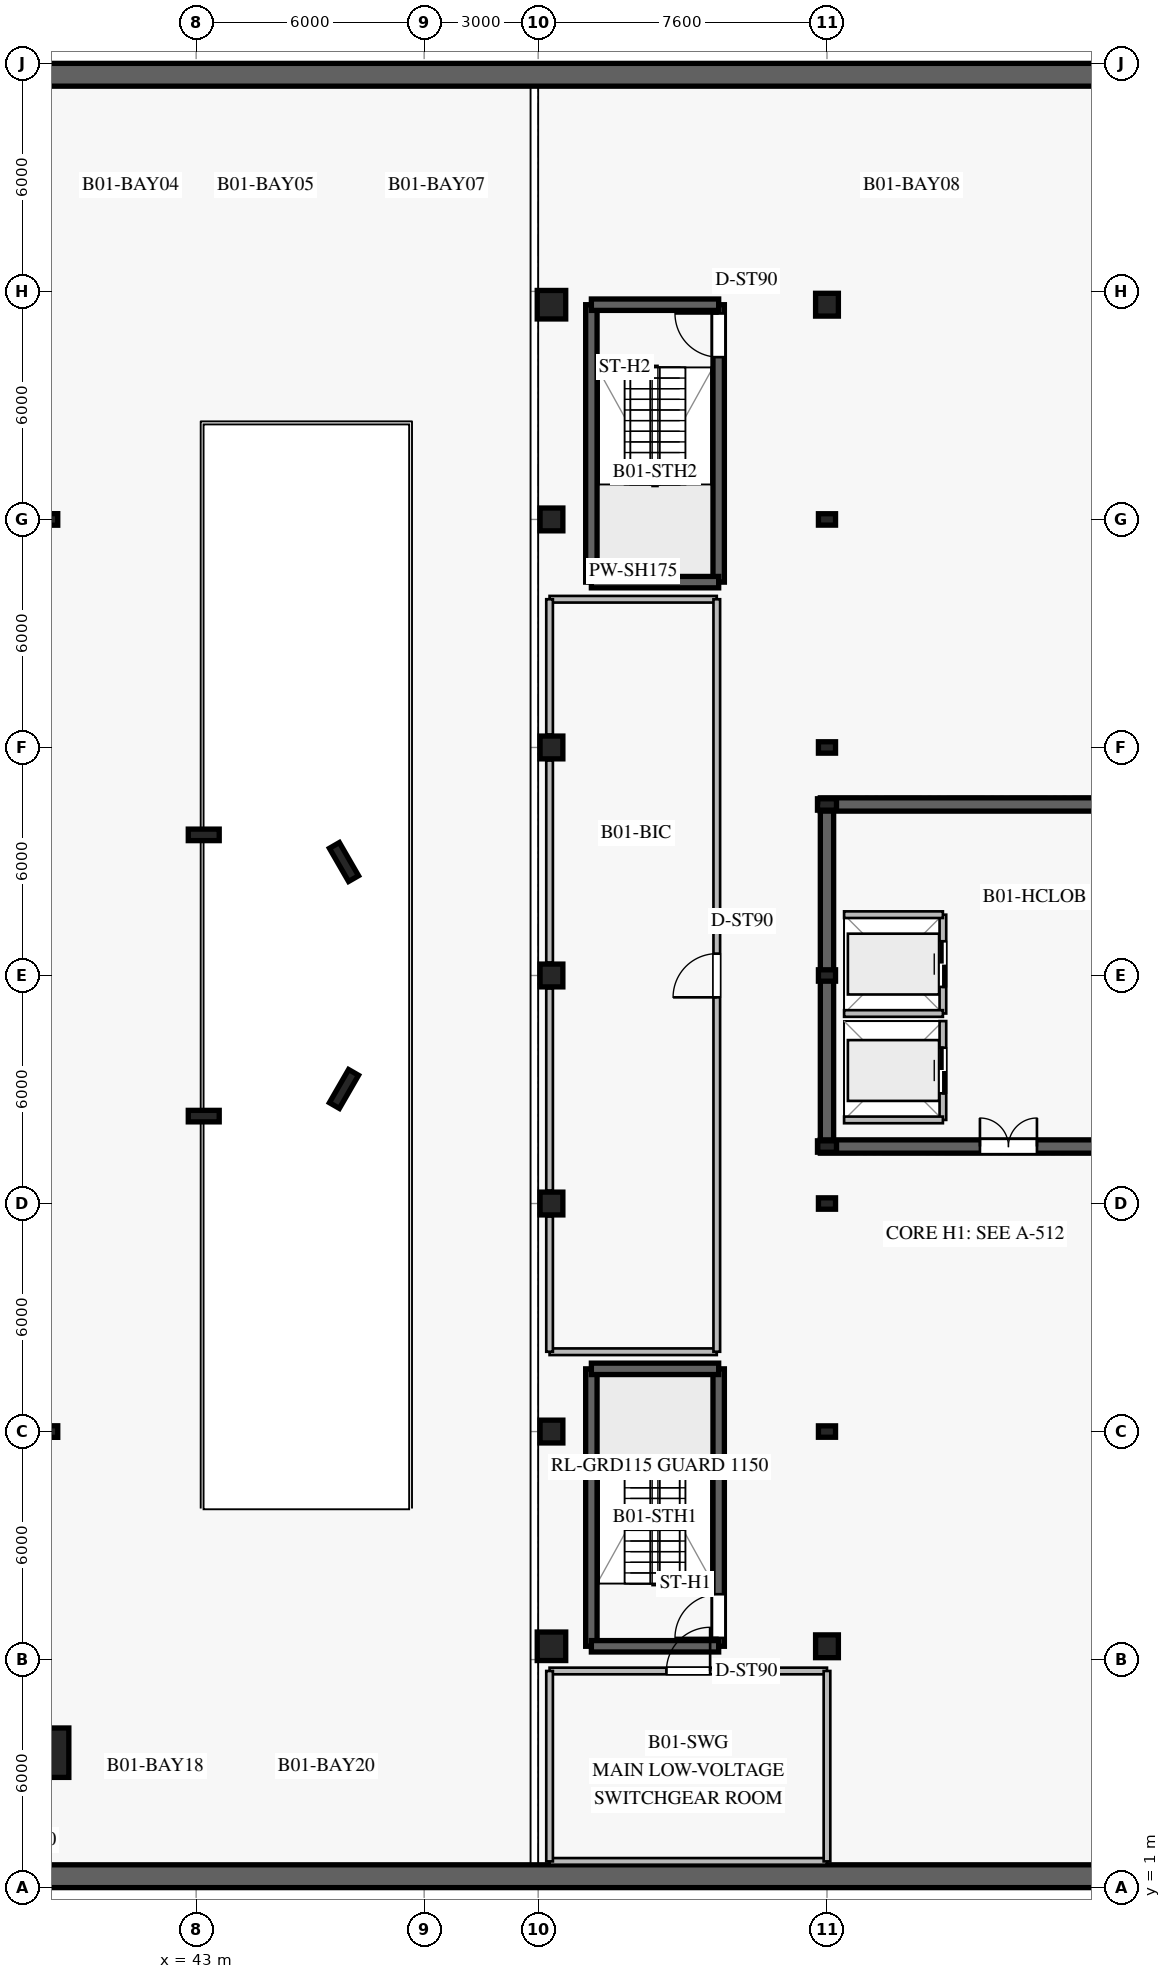
"""IFC4 building model, lengths in metres.
Left out: names, types, materials, properties, quantities, classifications, styles, units other than length and angle.
Written with IfcOpenShell. Run it as: python <this file> out.ifc"""

import sys

from ifc_helpers import new_model, si_unit, direction, frame, frame_2d, origin, origin_2d, place, context, subcontext, project, spatial, rectangle, i_section, extrude, element, fill, save


model = new_model("IFC4")
c1 = context("Model", 3, precision=1e-05, world=origin(), true_north=direction((0.0, 1.0)))
c2 = subcontext(c1, "Body", "Model", "MODEL_VIEW")
j1 = project(units=[si_unit("LENGTHUNIT", "METRE"), si_unit("PLANEANGLEUNIT", "RADIAN")], contexts=[c1])
p1 = place(None, origin())
s1 = spatial("IfcSite", under=j1, at=p1, CompositionType="ELEMENT")
p2 = place(p1, origin())
s2 = spatial("IfcBuilding", under=s1, at=p2, CompositionType="ELEMENT")
p3 = place(p2, frame((0.0, 0.0, -4.2)))
s3 = spatial("IfcBuildingStorey", under=s2, at=p3, CompositionType="ELEMENT", Elevation=-4.2)
for number, where, z_axis, x_axis in (
    (1, (1.0, 1.3, 0.0), (0.0, 0.0, 1.0), (1.0, 0.0, 0.0)),
    (2, (75.0, 48.7, 0.0), (0.0, 0.0, 1.0), (-1.0, 0.0, 0.0)),
):
    element("IfcWall", number, at=place(p3, frame(where, z_axis=z_axis, x_axis=x_axis)), inside=s3, PredefinedType="USERDEFINED", context=c2, shape_type="SweptSolid", body=[
        extrude(rectangle(XDim=74.0, YDim=0.6, at=frame_2d((37.0, 0.0))), origin(), (0.0, 0.0, 1.0), 3.88),
    ])
p4 = place(p3, frame((59.425, 20.5, 0.0), z_axis=(0.0, 0.0, 1.0), x_axis=(1.0, 0.0, 0.0)))
e3 = element("IfcWall", 3, at=p4, inside=s3, PredefinedType="SHEAR", context=c2, shape_type="SweptSolid", body=[
    extrude(rectangle(XDim=8.15, YDim=0.35, at=frame_2d((4.075, 0.0))), origin(), (0.0, 0.0, 1.0), 3.88),
])
p5 = place(p4, frame((4.2, 0.0, 0.0)))
e4 = element("IfcOpeningElement", 4, at=p5, cuts=e3, PredefinedType="OPENING", context=c2, shape_type="SweptSolid", body=[
    extrude(rectangle(XDim=1.5, YDim=2.2, at=frame_2d((0.75, 1.1))), frame((0.0, 0.185, 0.0), z_axis=(0.0, -1.0, 0.0), x_axis=(1.0, 0.0, 0.0)), (0.0, 0.0, 1.0), 0.37),
])
p6 = place(p3, frame((67.575, 29.5, 0.0), z_axis=(0.0, 0.0, 1.0), x_axis=(-1.0, 0.0, 0.0)))
e5 = element("IfcWall", 5, at=p6, inside=s3, PredefinedType="SHEAR", context=c2, shape_type="SweptSolid", body=[
    extrude(rectangle(XDim=8.15, YDim=0.35, at=frame_2d((4.075, 0.0))), origin(), (0.0, 0.0, 1.0), 3.88),
])
p7 = place(p3, frame((59.6, 29.325, 0.0), z_axis=(0.0, 0.0, 1.0), x_axis=(0.0, -1.0, 0.0)))
e6 = element("IfcWall", 6, at=p7, inside=s3, PredefinedType="SHEAR", context=c2, shape_type="SweptSolid", body=[
    extrude(rectangle(XDim=8.65, YDim=0.35, at=frame_2d((4.325, 0.0))), origin(), (0.0, 0.0, 1.0), 3.88),
])
for number, where, z_axis, x_axis in (
    (7, (59.6, 20.5, 0.0), (0.0, 0.0, 1.0), (1.0, 0.0, 0.0)),
    (8, (59.6, 29.5, 0.0), (0.0, 0.0, 1.0), (1.0, 0.0, 0.0)),
):
    element("IfcColumn", number, at=place(p3, frame(where, z_axis=z_axis, x_axis=x_axis)), inside=s3, PredefinedType="COLUMN", context=c2, shape_type="SweptSolid", body=[
        extrude(i_section(OverallWidth=0.3, OverallDepth=0.5, WebThickness=0.014, FlangeThickness=0.028, at=origin_2d()), origin(), (0.0, 0.0, 1.0), 4.2),
    ])
p8 = place(p3, frame((56.75, 7.35, 0.0), z_axis=(0.0, 0.0, 1.0), x_axis=(0.0, 1.0, 0.0)))
e9 = element("IfcWall", 9, at=p8, inside=s3, PredefinedType="SOLIDWALL", context=c2, shape_type="SweptSolid", body=[
    extrude(rectangle(XDim=7.3, YDim=0.3, at=frame_2d((3.65, 0.0))), origin(), (0.0, 0.0, 1.0), 3.88),
])
p9 = place(p8, frame((0.22, 0.0, 0.0)))
e10 = element("IfcOpeningElement", 10, at=p9, cuts=e9, PredefinedType="OPENING", context=c2, shape_type="SweptSolid", body=[
    extrude(rectangle(XDim=1.15, YDim=2.2, at=frame_2d((0.575, 1.1))), frame((0.0, 0.16, 0.0), z_axis=(0.0, -1.0, 0.0), x_axis=(1.0, 0.0, 0.0)), (0.0, 0.0, 1.0), 0.32),
])
p10 = place(p3, frame((53.4, 7.35, 0.0), z_axis=(0.0, 0.0, 1.0), x_axis=(0.0, 1.0, 0.0)))
e11 = element("IfcWall", 11, at=p10, inside=s3, PredefinedType="SOLIDWALL", context=c2, shape_type="SweptSolid", body=[
    extrude(rectangle(XDim=7.3, YDim=0.3, at=frame_2d((3.65, 0.0))), origin(), (0.0, 0.0, 1.0), 3.88),
])
for number, where, z_axis, x_axis in (
    (12, (53.4, 14.65, 0.0), (0.0, 0.0, 1.0), (1.0, 0.0, 0.0)),
    (13, (53.4, 7.35, 0.0), (0.0, 0.0, 1.0), (1.0, 0.0, 0.0)),
):
    element("IfcWall", number, at=place(p3, frame(where, z_axis=z_axis, x_axis=x_axis)), inside=s3, PredefinedType="SOLIDWALL", context=c2, shape_type="SweptSolid", body=[
        extrude(rectangle(XDim=3.35, YDim=0.3, at=frame_2d((1.675, 0.0))), origin(), (0.0, 0.0, 1.0), 3.88),
    ])
p11 = place(p3, frame((56.75, 35.35, 0.0), z_axis=(0.0, 0.0, 1.0), x_axis=(0.0, 1.0, 0.0)))
e14 = element("IfcWall", 14, at=p11, inside=s3, PredefinedType="SOLIDWALL", context=c2, shape_type="SweptSolid", body=[
    extrude(rectangle(XDim=7.3, YDim=0.3, at=frame_2d((3.65, 0.0))), origin(), (0.0, 0.0, 1.0), 3.88),
])
p12 = place(p11, frame((5.92, 0.0, 0.0)))
e15 = element("IfcOpeningElement", 15, at=p12, cuts=e14, PredefinedType="OPENING", context=c2, shape_type="SweptSolid", body=[
    extrude(rectangle(XDim=1.15, YDim=2.2, at=frame_2d((0.575, 1.1))), frame((0.0, 0.16, 0.0), z_axis=(0.0, -1.0, 0.0), x_axis=(1.0, 0.0, 0.0)), (0.0, 0.0, 1.0), 0.32),
])
p13 = place(p3, frame((53.4, 35.35, 0.0), z_axis=(0.0, 0.0, 1.0), x_axis=(0.0, 1.0, 0.0)))
e16 = element("IfcWall", 16, at=p13, inside=s3, PredefinedType="SOLIDWALL", context=c2, shape_type="SweptSolid", body=[
    extrude(rectangle(XDim=7.3, YDim=0.3, at=frame_2d((3.65, 0.0))), origin(), (0.0, 0.0, 1.0), 3.88),
])
for number, where, z_axis, x_axis in (
    (17, (53.4, 35.35, 0.0), (0.0, 0.0, 1.0), (1.0, 0.0, 0.0)),
    (18, (53.4, 42.65, 0.0), (0.0, 0.0, 1.0), (1.0, 0.0, 0.0)),
):
    element("IfcWall", number, at=place(p3, frame(where, z_axis=z_axis, x_axis=x_axis)), inside=s3, PredefinedType="SOLIDWALL", context=c2, shape_type="SweptSolid", body=[
        extrude(rectangle(XDim=3.35, YDim=0.3, at=frame_2d((1.675, 0.0))), origin(), (0.0, 0.0, 1.0), 3.88),
    ])
for number, where, z_axis, x_axis in (
    (19, (43.2, 21.3, 0.0), (0.0, 0.0, 1.0), (1.0, 0.0, 0.0)),
    (20, (43.2, 28.7, 0.0), (0.0, 0.0, 1.0), (1.0, 0.0, 0.0)),
):
    element("IfcColumn", number, at=place(p3, frame(where, z_axis=z_axis, x_axis=x_axis)), inside=s3, PredefinedType="COLUMN", context=c2, shape_type="SweptSolid", body=[
        extrude(i_section(OverallWidth=0.303, OverallDepth=0.814, WebThickness=0.021, FlangeThickness=0.04, at=origin_2d()), origin(), (0.0, 0.0, 1.0), 4.2),
    ])
for number, where, z_axis, x_axis in (
    (21, (46.89, 27.986, 0.0), (0.0, 0.0, 1.0), (-0.5, 0.866, 0.0)),
    (22, (46.89, 22.014, 0.0), (0.0, 0.0, 1.0), (0.5, 0.866, 0.0)),
):
    element("IfcColumn", number, at=place(p3, frame(where, z_axis=z_axis, x_axis=x_axis)), inside=s3, PredefinedType="COLUMN", context=c2, shape_type="SweptSolid", body=[
        extrude(i_section(OverallWidth=0.302, OverallDepth=1.008, WebThickness=0.021, FlangeThickness=0.04, at=origin_2d()), origin(), (0.0, 0.0, 1.0), 4.2),
    ])
p14 = place(p3, frame((39.0, 4.55, 0.0), z_axis=(0.0, 0.0, 1.0), x_axis=(1.0, 0.0, 0.0)))
e23 = element("IfcColumn", 23, at=p14, inside=s3, PredefinedType="COLUMN", context=c2, shape_type="SweptSolid", body=[
    extrude(rectangle(XDim=1.3, YDim=1.3, at=origin_2d()), origin(), (0.0, 0.0, 1.0), 4.2),
])
p15 = place(p3, frame((52.35, 7.35, 0.0), z_axis=(0.0, 0.0, 1.0), x_axis=(1.0, 0.0, 0.0)))
e24 = element("IfcColumn", 24, at=p15, inside=s3, PredefinedType="COLUMN", context=c2, shape_type="SweptSolid", body=[
    extrude(rectangle(XDim=0.75, YDim=0.75, at=origin_2d()), origin(), (0.0, 0.0, 1.0), 4.2),
])
for number, where, z_axis, x_axis in (
    (25, (52.35, 13.0, 0.0), (0.0, 0.0, 1.0), (1.0, 0.0, 0.0)),
    (26, (52.35, 19.0, 0.0), (0.0, 0.0, 1.0), (1.0, 0.0, 0.0)),
    (27, (52.35, 25.0, 0.0), (0.0, 0.0, 1.0), (1.0, 0.0, 0.0)),
    (28, (52.35, 31.0, 0.0), (0.0, 0.0, 1.0), (1.0, 0.0, 0.0)),
    (29, (52.35, 37.0, 0.0), (0.0, 0.0, 1.0), (1.0, 0.0, 0.0)),
):
    element("IfcColumn", number, at=place(p3, frame(where, z_axis=z_axis, x_axis=x_axis)), inside=s3, PredefinedType="COLUMN", context=c2, shape_type="SweptSolid", body=[
        extrude(rectangle(XDim=0.6, YDim=0.6, at=origin_2d()), origin(), (0.0, 0.0, 1.0), 4.2),
    ])
p16 = place(p3, frame((52.35, 42.65, 0.0), z_axis=(0.0, 0.0, 1.0), x_axis=(1.0, 0.0, 0.0)))
e30 = element("IfcColumn", 30, at=p16, inside=s3, PredefinedType="COLUMN", context=c2, shape_type="SweptSolid", body=[
    extrude(rectangle(XDim=0.75, YDim=0.75, at=origin_2d()), origin(), (0.0, 0.0, 1.0), 4.2),
])
p17 = place(p3, frame((59.6, 7.35, 0.0), z_axis=(0.0, 0.0, 1.0), x_axis=(1.0, 0.0, 0.0)))
e31 = element("IfcColumn", 31, at=p17, inside=s3, PredefinedType="COLUMN", context=c2, shape_type="SweptSolid", body=[
    extrude(rectangle(XDim=0.6, YDim=0.6, at=origin_2d()), origin(), (0.0, 0.0, 1.0), 4.2),
])
for number, where, z_axis, x_axis in (
    (32, (59.6, 13.0, 0.0), (0.0, 0.0, 1.0), (1.0, 0.0, 0.0)),
    (33, (59.6, 19.0, 0.0), (0.0, 0.0, 1.0), (1.0, 0.0, 0.0)),
    (34, (59.6, 25.0, 0.0), (0.0, 0.0, 1.0), (1.0, 0.0, 0.0)),
    (35, (59.6, 31.0, 0.0), (0.0, 0.0, 1.0), (1.0, 0.0, 0.0)),
    (36, (59.6, 37.0, 0.0), (0.0, 0.0, 1.0), (1.0, 0.0, 0.0)),
):
    element("IfcColumn", number, at=place(p3, frame(where, z_axis=z_axis, x_axis=x_axis)), inside=s3, PredefinedType="COLUMN", context=c2, shape_type="SweptSolid", body=[
        extrude(i_section(OverallWidth=0.3, OverallDepth=0.45, WebThickness=0.014, FlangeThickness=0.026, at=origin_2d()), origin(), (0.0, 0.0, 1.0), 4.2),
    ])
p18 = place(p3, frame((59.6, 42.65, 0.0), z_axis=(0.0, 0.0, 1.0), x_axis=(1.0, 0.0, 0.0)))
e37 = element("IfcColumn", 37, at=p18, inside=s3, PredefinedType="COLUMN", context=c2, shape_type="SweptSolid", body=[
    extrude(rectangle(XDim=0.6, YDim=0.6, at=origin_2d()), origin(), (0.0, 0.0, 1.0), 4.2),
])
p19 = place(p3, frame((62.65, 21.2, 0.0), z_axis=(0.0, 0.0, 1.0), x_axis=(0.0, 1.0, 0.0)))
e38 = element("IfcWall", 38, at=p19, inside=s3, PredefinedType="PARTITIONING", context=c2, shape_type="SweptSolid", body=[
    extrude(rectangle(XDim=2.6, YDim=0.175, at=frame_2d((1.3, 0.0))), origin(), (0.0, 0.0, 1.0), 3.88),
])
p20 = place(p19, frame((0.7, 0.0, 0.0)))
e39 = element("IfcOpeningElement", 39, at=p20, cuts=e38, PredefinedType="OPENING", context=c2, shape_type="SweptSolid", body=[
    extrude(rectangle(XDim=1.2, YDim=2.2, at=frame_2d((0.6, 1.1))), frame((0.0, 0.098, 0.0), z_axis=(0.0, -1.0, 0.0), x_axis=(1.0, 0.0, 0.0)), (0.0, 0.0, 1.0), 0.195),
])
p21 = place(p3, frame((60.05, 21.2, 0.0), z_axis=(0.0, 0.0, 1.0), x_axis=(1.0, 0.0, 0.0)))
e40 = element("IfcWall", 40, at=p21, inside=s3, PredefinedType="PARTITIONING", context=c2, shape_type="SweptSolid", body=[
    extrude(rectangle(XDim=2.6, YDim=0.175, at=frame_2d((1.3, 0.0))), origin(), (0.0, 0.0, 1.0), 3.88),
])
p22 = place(p3, frame((62.65, 24.0, 0.0), z_axis=(0.0, 0.0, 1.0), x_axis=(0.0, 1.0, 0.0)))
e41 = element("IfcWall", 41, at=p22, inside=s3, PredefinedType="PARTITIONING", context=c2, shape_type="SweptSolid", body=[
    extrude(rectangle(XDim=2.6, YDim=0.175, at=frame_2d((1.3, 0.0))), origin(), (0.0, 0.0, 1.0), 3.52),
])
p23 = place(p22, frame((0.7, 0.0, 0.0)))
e42 = element("IfcOpeningElement", 42, at=p23, cuts=e41, PredefinedType="OPENING", context=c2, shape_type="SweptSolid", body=[
    extrude(rectangle(XDim=1.2, YDim=2.2, at=frame_2d((0.6, 1.1))), frame((0.0, 0.098, 0.0), z_axis=(0.0, -1.0, 0.0), x_axis=(1.0, 0.0, 0.0)), (0.0, 0.0, 1.0), 0.195),
])
for number, where, z_axis, x_axis in (
    (43, (60.05, 24.0, 0.0), (0.0, 0.0, 1.0), (1.0, 0.0, 0.0)),
    (44, (60.05, 26.6, 0.0), (0.0, 0.0, 1.0), (1.0, 0.0, 0.0)),
):
    element("IfcWall", number, at=place(p3, frame(where, z_axis=z_axis, x_axis=x_axis)), inside=s3, PredefinedType="PARTITIONING", context=c2, shape_type="SweptSolid", body=[
        extrude(rectangle(XDim=2.6, YDim=0.175, at=frame_2d((1.3, 0.0))), origin(), (0.0, 0.0, 1.0), 3.88),
    ])
for number, where, z_axis, x_axis in (
    (45, (52.3, 34.9, 0.0), (0.0, 0.0, 1.0), (1.0, 0.0, 0.0)),
    (46, (52.3, 15.1, 0.0), (0.0, 0.0, 1.0), (1.0, 0.0, 0.0)),
):
    element("IfcWall", number, at=place(p3, frame(where, z_axis=z_axis, x_axis=x_axis)), inside=s3, PredefinedType="PARTITIONING", context=c2, shape_type="SweptSolid", body=[
        extrude(rectangle(XDim=4.4, YDim=0.175, at=frame_2d((2.2, 0.0))), origin(), (0.0, 0.0, 1.0), 3.52),
    ])
p24 = place(p3, frame((52.3, 15.1, 0.0), z_axis=(0.0, 0.0, 1.0), x_axis=(0.0, 1.0, 0.0)))
e47 = element("IfcWall", 47, at=p24, inside=s3, PredefinedType="PARTITIONING", context=c2, shape_type="SweptSolid", body=[
    extrude(rectangle(XDim=3.56, YDim=0.175, at=frame_2d((1.78, 0.0))), origin(), (0.0, 0.0, 1.0), 3.52),
])
for number, where, z_axis, x_axis in (
    (48, (52.3, 19.34, 0.0), (0.0, 0.0, 1.0), (0.0, 1.0, 0.0)),
    (49, (52.3, 25.34, 0.0), (0.0, 0.0, 1.0), (0.0, 1.0, 0.0)),
):
    element("IfcWall", number, at=place(p3, frame(where, z_axis=z_axis, x_axis=x_axis)), inside=s3, PredefinedType="PARTITIONING", context=c2, shape_type="SweptSolid", body=[
        extrude(rectangle(XDim=5.32, YDim=0.175, at=frame_2d((2.66, 0.0))), origin(), (0.0, 0.0, 1.0), 3.52),
    ])
p25 = place(p3, frame((52.3, 31.34, 0.0), z_axis=(0.0, 0.0, 1.0), x_axis=(0.0, 1.0, 0.0)))
e50 = element("IfcWall", 50, at=p25, inside=s3, PredefinedType="PARTITIONING", context=c2, shape_type="SweptSolid", body=[
    extrude(rectangle(XDim=3.56, YDim=0.175, at=frame_2d((1.78, 0.0))), origin(), (0.0, 0.0, 1.0), 3.52),
])
p26 = place(p3, frame((56.7, 15.1, 0.0), z_axis=(0.0, 0.0, 1.0), x_axis=(0.0, 1.0, 0.0)))
e51 = element("IfcWall", 51, at=p26, inside=s3, PredefinedType="PARTITIONING", context=c2, shape_type="SweptSolid", body=[
    extrude(rectangle(XDim=19.8, YDim=0.175, at=frame_2d((9.9, 0.0))), origin(), (0.0, 0.0, 1.0), 3.52),
])
p27 = place(p26, frame((9.325, 0.0, 0.0)))
e52 = element("IfcOpeningElement", 52, at=p27, cuts=e51, PredefinedType="OPENING", context=c2, shape_type="SweptSolid", body=[
    extrude(rectangle(XDim=1.15, YDim=2.2, at=frame_2d((0.575, 1.1))), frame((0.0, 0.098, 0.0), z_axis=(0.0, -1.0, 0.0), x_axis=(1.0, 0.0, 0.0)), (0.0, 0.0, 1.0), 0.195),
])
p28 = place(p3, frame((52.3, 6.7, 0.0), z_axis=(0.0, 0.0, 1.0), x_axis=(1.0, 0.0, 0.0)))
e53 = element("IfcWall", 53, at=p28, inside=s3, PredefinedType="PARTITIONING", context=c2, shape_type="SweptSolid", body=[
    extrude(rectangle(XDim=7.3, YDim=0.175, at=frame_2d((3.65, 0.0))), origin(), (0.0, 0.0, 1.0), 3.15),
])
p29 = place(p28, frame((3.075, 0.0, 0.0)))
e54 = element("IfcOpeningElement", 54, at=p29, cuts=e53, PredefinedType="OPENING", context=c2, shape_type="SweptSolid", body=[
    extrude(rectangle(XDim=1.15, YDim=2.2, at=frame_2d((0.575, 1.1))), frame((0.0, 0.098, 0.0), z_axis=(0.0, -1.0, 0.0), x_axis=(1.0, 0.0, 0.0)), (0.0, 0.0, 1.0), 0.195),
])
p30 = place(p3, frame((52.3, 1.69, 0.0), z_axis=(0.0, 0.0, 1.0), x_axis=(1.0, 0.0, 0.0)))
e55 = element("IfcWall", 55, at=p30, inside=s3, PredefinedType="PARTITIONING", context=c2, shape_type="SweptSolid", body=[
    extrude(rectangle(XDim=7.3, YDim=0.175, at=frame_2d((3.65, 0.0))), origin(), (0.0, 0.0, 1.0), 3.15),
])
for number, where, z_axis, x_axis in (
    (56, (52.3, 1.69, 0.0), (0.0, 0.0, 1.0), (0.0, 1.0, 0.0)),
    (57, (59.6, 1.69, 0.0), (0.0, 0.0, 1.0), (0.0, 1.0, 0.0)),
):
    element("IfcWall", number, at=place(p3, frame(where, z_axis=z_axis, x_axis=x_axis)), inside=s3, PredefinedType="PARTITIONING", context=c2, shape_type="SweptSolid", body=[
        extrude(rectangle(XDim=5.01, YDim=0.175, at=frame_2d((2.505, 0.0))), origin(), (0.0, 0.0, 1.0), 3.15),
    ])
p31 = place(p20, origin())
e58 = element("IfcDoor", 58, at=p31, inside=s3, OperationType="DOUBLE_DOOR_SLIDING", PredefinedType="DOOR", context=c2, shape_type="SweptSolid", body=[
    extrude(rectangle(XDim=1.2, YDim=2.2, at=frame_2d((0.6, 1.1))), frame((0.0, 0.025, 0.0), z_axis=(0.0, -1.0, 0.0), x_axis=(1.0, 0.0, 0.0)), (0.0, 0.0, 1.0), 0.05),
])
fill(e39, e58)
p32 = place(p23, origin())
e59 = element("IfcDoor", 59, at=p32, inside=s3, OperationType="DOUBLE_DOOR_SLIDING", PredefinedType="DOOR", context=c2, shape_type="SweptSolid", body=[
    extrude(rectangle(XDim=1.2, YDim=2.2, at=frame_2d((0.6, 1.1))), frame((0.0, 0.025, 0.0), z_axis=(0.0, -1.0, 0.0), x_axis=(1.0, 0.0, 0.0)), (0.0, 0.0, 1.0), 0.05),
])
fill(e42, e59)
p33 = place(p9, origin())
e60 = element("IfcDoor", 60, at=p33, inside=s3, OperationType="SINGLE_SWING_LEFT", PredefinedType="DOOR", context=c2, shape_type="SweptSolid", body=[
    extrude(rectangle(XDim=1.15, YDim=2.2, at=frame_2d((0.575, 1.1))), frame((0.0, 0.025, 0.0), z_axis=(0.0, -1.0, 0.0), x_axis=(1.0, 0.0, 0.0)), (0.0, 0.0, 1.0), 0.05),
])
fill(e10, e60)
p34 = place(p12, origin())
e61 = element("IfcDoor", 61, at=p34, inside=s3, OperationType="SINGLE_SWING_RIGHT", PredefinedType="DOOR", context=c2, shape_type="SweptSolid", body=[
    extrude(rectangle(XDim=1.15, YDim=2.2, at=frame_2d((0.575, 1.1))), frame((0.0, 0.025, 0.0), z_axis=(0.0, -1.0, 0.0), x_axis=(1.0, 0.0, 0.0)), (0.0, 0.0, 1.0), 0.05),
])
fill(e15, e61)
p35 = place(p5, origin())
e62 = element("IfcDoor", 62, at=p35, inside=s3, OperationType="DOUBLE_DOOR_SINGLE_SWING", PredefinedType="DOOR", context=c2, shape_type="SweptSolid", body=[
    extrude(rectangle(XDim=1.5, YDim=2.2, at=frame_2d((0.75, 1.1))), frame((0.0, 0.025, 0.0), z_axis=(0.0, -1.0, 0.0), x_axis=(1.0, 0.0, 0.0)), (0.0, 0.0, 1.0), 0.05),
])
fill(e4, e62)
p36 = place(p27, origin())
e63 = element("IfcDoor", 63, at=p36, inside=s3, OperationType="SINGLE_SWING_LEFT", PredefinedType="DOOR", context=c2, shape_type="SweptSolid", body=[
    extrude(rectangle(XDim=1.15, YDim=2.2, at=frame_2d((0.575, 1.1))), frame((0.0, 0.025, 0.0), z_axis=(0.0, -1.0, 0.0), x_axis=(1.0, 0.0, 0.0)), (0.0, 0.0, 1.0), 0.05),
])
fill(e52, e63)
p37 = place(p29, origin())
e64 = element("IfcDoor", 64, at=p37, inside=s3, OperationType="SINGLE_SWING_RIGHT", PredefinedType="DOOR", context=c2, shape_type="SweptSolid", body=[
    extrude(rectangle(XDim=1.15, YDim=2.2, at=frame_2d((0.575, 1.1))), frame((0.0, 0.025, 0.0), z_axis=(0.0, -1.0, 0.0), x_axis=(1.0, 0.0, 0.0)), (0.0, 0.0, 1.0), 0.05),
])
fill(e54, e64)
save(model, sys.argv[1])
